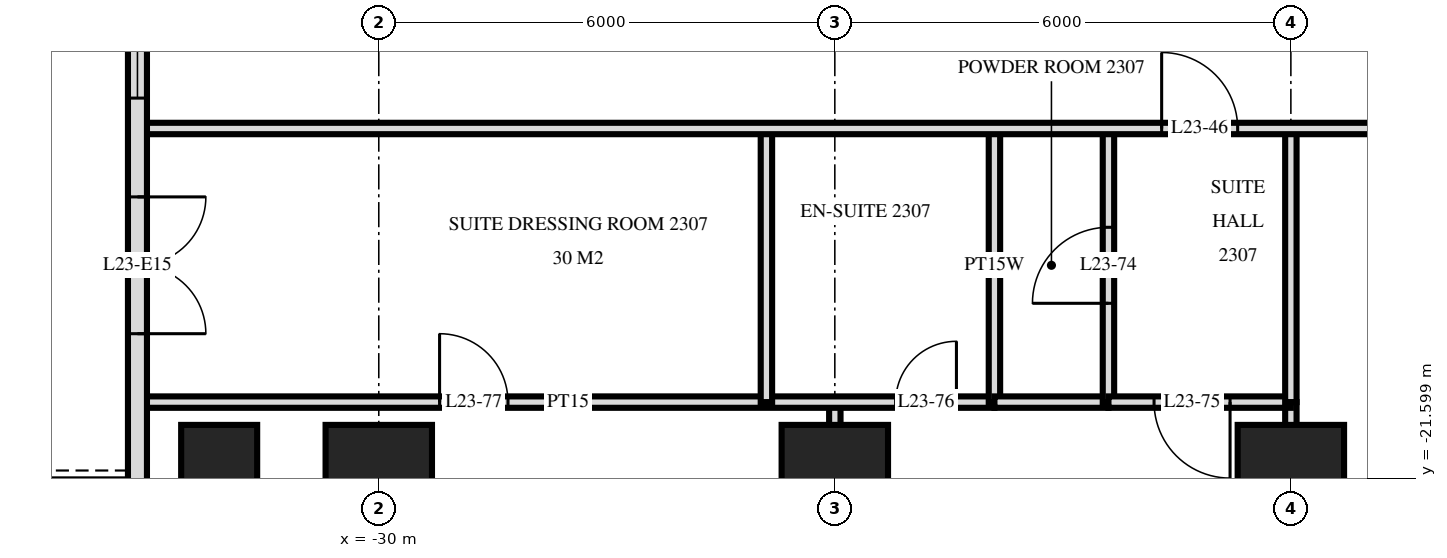
"""IFC4 building model, lengths in metres.
Left out: names, types, materials, properties, quantities, classifications, styles, units other than length and angle.
Written with IfcOpenShell. Run it as: python <this file> out.ifc"""

import sys

from ifc_helpers import new_model, si_unit, direction, frame, frame_2d, origin, origin_2d, place, context, subcontext, project, spatial, rectangle, extrude, element, fill, save


model = new_model("IFC4")
c1 = context("Model", 3, precision=1e-05, world=origin(), true_north=direction((0.0, 1.0)))
c2 = subcontext(c1, "Body", "Model", "MODEL_VIEW")
j1 = project(units=[si_unit("LENGTHUNIT", "METRE"), si_unit("PLANEANGLEUNIT", "RADIAN")], contexts=[c1])
p1 = place(None, origin())
s1 = spatial("IfcSite", under=j1, at=p1, CompositionType="ELEMENT")
p2 = place(p1, origin())
s2 = spatial("IfcBuilding", under=s1, at=p2, CompositionType="ELEMENT")
p3 = place(p2, frame((0.0, 0.0, 92.4)))
s3 = spatial("IfcBuildingStorey", under=s2, at=p3, CompositionType="ELEMENT", Elevation=92.4)
p4 = place(p3, frame((-32.1, -21.6, 0.0), z_axis=(0.0, 0.0, 1.0), x_axis=(0.0, 1.0, 0.0)))
e1 = element("IfcColumn", 1, at=p4, inside=s3, PredefinedType="COLUMN", context=c2, shape_type="SweptSolid", body=[
    extrude(rectangle(XDim=1.4, YDim=1.0, at=origin_2d()), origin(), (0.0, 0.0, 1.0), 3.6),
])
for number, where, z_axis, x_axis in (
    (2, (-30.0, -21.6, 0.0), (0.0, 0.0, 1.0), (1.0, 0.0, 0.0)),
    (3, (-24.0, -21.6, 0.0), (0.0, 0.0, 1.0), (1.0, 0.0, 0.0)),
    (4, (-18.0, -21.6, 0.0), (0.0, 0.0, 1.0), (1.0, 0.0, 0.0)),
):
    element("IfcColumn", number, at=place(p3, frame(where, z_axis=z_axis, x_axis=x_axis)), inside=s3, PredefinedType="COLUMN", context=c2, shape_type="SweptSolid", body=[
        extrude(rectangle(XDim=1.4, YDim=1.4, at=origin_2d()), origin(), (0.0, 0.0, 1.0), 3.6),
    ])
p5 = place(p3, frame((-33.175, -3.325, 0.0), z_axis=(0.0, 0.0, 1.0), x_axis=(0.0, -1.0, 0.0)))
e5 = element("IfcWall", 5, at=p5, inside=s3, PredefinedType="SOLIDWALL", context=c2, shape_type="SweptSolid", body=[
    extrude(rectangle(XDim=21.551, YDim=0.25, at=frame_2d((10.775, 0.0))), origin(), (0.0, 0.0, 1.0), 3.32),
])
p6 = place(p5, frame((7.025, 0.0, 0.0)))
e6 = element("IfcOpeningElement", 6, at=p6, cuts=e5, PredefinedType="OPENING", context=c2, shape_type="SweptSolid", body=[
    extrude(rectangle(XDim=1.8, YDim=2.4, at=frame_2d((0.9, 1.2))), frame((0.0, 0.135, 0.0), z_axis=(0.0, -1.0, 0.0), x_axis=(1.0, 0.0, 0.0)), (0.0, 0.0, 1.0), 0.27),
])
p7 = place(p5, frame((12.075, 0.0, 0.3)))
e7 = element("IfcOpeningElement", 7, at=p7, cuts=e5, PredefinedType="OPENING", context=c2, shape_type="SweptSolid", body=[
    extrude(rectangle(XDim=1.2, YDim=2.1, at=frame_2d((0.6, 1.05))), frame((0.0, 0.135, 0.0), z_axis=(0.0, -1.0, 0.0), x_axis=(1.0, 0.0, 0.0)), (0.0, 0.0, 1.0), 0.27),
])
p8 = place(p5, frame((14.575, 0.0, 0.0)))
e8 = element("IfcOpeningElement", 8, at=p8, cuts=e5, PredefinedType="OPENING", context=c2, shape_type="SweptSolid", body=[
    extrude(rectangle(XDim=1.8, YDim=2.4, at=frame_2d((0.9, 1.2))), frame((0.0, 0.135, 0.0), z_axis=(0.0, -1.0, 0.0), x_axis=(1.0, 0.0, 0.0)), (0.0, 0.0, 1.0), 0.27),
])
p9 = place(p5, frame((18.875, 0.0, 0.0)))
e9 = element("IfcOpeningElement", 9, at=p9, cuts=e5, PredefinedType="OPENING", context=c2, shape_type="SweptSolid", body=[
    extrude(rectangle(XDim=1.8, YDim=2.4, at=frame_2d((0.9, 1.2))), frame((0.0, 0.135, 0.0), z_axis=(0.0, -1.0, 0.0), x_axis=(1.0, 0.0, 0.0)), (0.0, 0.0, 1.0), 0.27),
])
p10 = place(p3, frame((-18.0, -20.6, 0.0), z_axis=(0.0, 0.0, 1.0), x_axis=(0.0, 1.0, 0.0)))
e10 = element("IfcWall", 10, at=p10, inside=s3, PredefinedType="PARTITIONING", context=c2, shape_type="SweptSolid", body=[
    extrude(rectangle(XDim=3.6, YDim=0.15, at=frame_2d((1.8, 0.0))), origin(), (0.0, 0.0, 1.0), 3.32),
])
p11 = place(p3, frame((-18.0, -29.22, 0.0), z_axis=(0.0, 0.0, 1.0), x_axis=(0.0, 1.0, 0.0)))
e11 = element("IfcWall", 11, at=p11, inside=s3, PredefinedType="PARTITIONING", context=c2, shape_type="SweptSolid", body=[
    extrude(rectangle(XDim=8.62, YDim=0.15, at=frame_2d((4.31, 0.0))), origin(), (0.0, 0.0, 1.0), 3.32),
])
p12 = place(p3, frame((-20.4, -20.6, 0.0), z_axis=(0.0, 0.0, 1.0), x_axis=(0.0, 1.0, 0.0)))
e12 = element("IfcWall", 12, at=p12, inside=s3, PredefinedType="PARTITIONING", context=c2, shape_type="SweptSolid", body=[
    extrude(rectangle(XDim=3.6, YDim=0.15, at=frame_2d((1.8, 0.0))), origin(), (0.0, 0.0, 1.0), 3.32),
])
p13 = place(p12, frame((1.3, 0.0, 0.0)))
e13 = element("IfcOpeningElement", 13, at=p13, cuts=e12, PredefinedType="OPENING", context=c2, shape_type="SweptSolid", body=[
    extrude(rectangle(XDim=1.0, YDim=2.1, at=frame_2d((0.5, 1.05))), frame((0.0, 0.085, 0.0), z_axis=(0.0, -1.0, 0.0), x_axis=(1.0, 0.0, 0.0)), (0.0, 0.0, 1.0), 0.17),
])
p14 = place(p3, frame((-21.9, -20.6, 0.0), z_axis=(0.0, 0.0, 1.0), x_axis=(0.0, 1.0, 0.0)))
e14 = element("IfcWall", 14, at=p14, inside=s3, PredefinedType="PLUMBINGWALL", context=c2, shape_type="SweptSolid", body=[
    extrude(rectangle(XDim=3.6, YDim=0.15, at=frame_2d((1.8, 0.0))), origin(), (0.0, 0.0, 1.0), 3.32),
])
p15 = place(p3, frame((-24.0, -29.22, 0.0), z_axis=(0.0, 0.0, 1.0), x_axis=(0.0, 1.0, 0.0)))
e15 = element("IfcWall", 15, at=p15, inside=s3, PredefinedType="PARTITIONING", context=c2, shape_type="SweptSolid", body=[
    extrude(rectangle(XDim=8.62, YDim=0.15, at=frame_2d((4.31, 0.0))), origin(), (0.0, 0.0, 1.0), 3.32),
])
p16 = place(p15, frame((3.79, 0.0, 0.0)))
e16 = element("IfcOpeningElement", 16, at=p16, cuts=e15, PredefinedType="OPENING", context=c2, shape_type="SweptSolid", body=[
    extrude(rectangle(XDim=0.9, YDim=2.1, at=frame_2d((0.45, 1.05))), frame((0.0, 0.085, 0.0), z_axis=(0.0, -1.0, 0.0), x_axis=(1.0, 0.0, 0.0)), (0.0, 0.0, 1.0), 0.17),
])
p17 = place(p3, frame((-24.9, -20.6, 0.0), z_axis=(0.0, 0.0, 1.0), x_axis=(0.0, 1.0, 0.0)))
e17 = element("IfcWall", 17, at=p17, inside=s3, PredefinedType="PARTITIONING", context=c2, shape_type="SweptSolid", body=[
    extrude(rectangle(XDim=3.6, YDim=0.15, at=frame_2d((1.8, 0.0))), origin(), (0.0, 0.0, 1.0), 3.32),
])
p18 = place(p3, frame((-20.4, -20.6, 0.0), z_axis=(0.0, 0.0, 1.0), x_axis=(1.0, 0.0, 0.0)))
e18 = element("IfcWall", 18, at=p18, inside=s3, PredefinedType="PARTITIONING", context=c2, shape_type="SweptSolid", body=[
    extrude(rectangle(XDim=2.4, YDim=0.15, at=frame_2d((1.2, 0.0))), origin(), (0.0, 0.0, 1.0), 3.32),
])
p19 = place(p18, frame((0.6, 0.0, 0.0)))
e19 = element("IfcOpeningElement", 19, at=p19, cuts=e18, PredefinedType="OPENING", context=c2, shape_type="SweptSolid", body=[
    extrude(rectangle(XDim=1.0, YDim=2.1, at=frame_2d((0.5, 1.05))), frame((0.0, 0.085, 0.0), z_axis=(0.0, -1.0, 0.0), x_axis=(1.0, 0.0, 0.0)), (0.0, 0.0, 1.0), 0.17),
])
p20 = place(p3, frame((-33.12, -20.6, 0.0), z_axis=(0.0, 0.0, 1.0), x_axis=(1.0, 0.0, 0.0)))
e20 = element("IfcWall", 20, at=p20, inside=s3, PredefinedType="PARTITIONING", context=c2, shape_type="SweptSolid", body=[
    extrude(rectangle(XDim=11.22, YDim=0.15, at=frame_2d((5.61, 0.0))), origin(), (0.0, 0.0, 1.0), 3.32),
])
p21 = place(p20, frame((9.92, 0.0, 0.0)))
e21 = element("IfcOpeningElement", 21, at=p21, cuts=e20, PredefinedType="OPENING", context=c2, shape_type="SweptSolid", body=[
    extrude(rectangle(XDim=0.8, YDim=2.1, at=frame_2d((0.4, 1.05))), frame((0.0, 0.085, 0.0), z_axis=(0.0, -1.0, 0.0), x_axis=(1.0, 0.0, 0.0)), (0.0, 0.0, 1.0), 0.17),
])
p22 = place(p20, frame((3.92, 0.0, 0.0)))
e22 = element("IfcOpeningElement", 22, at=p22, cuts=e20, PredefinedType="OPENING", context=c2, shape_type="SweptSolid", body=[
    extrude(rectangle(XDim=0.9, YDim=2.1, at=frame_2d((0.45, 1.05))), frame((0.0, 0.085, 0.0), z_axis=(0.0, -1.0, 0.0), x_axis=(1.0, 0.0, 0.0)), (0.0, 0.0, 1.0), 0.17),
])
p23 = place(p3, frame((-21.9, -20.6, 0.0), z_axis=(0.0, 0.0, 1.0), x_axis=(1.0, 0.0, 0.0)))
e23 = element("IfcWall", 23, at=p23, inside=s3, PredefinedType="PLUMBINGWALL", context=c2, shape_type="SweptSolid", body=[
    extrude(rectangle(XDim=1.5, YDim=0.15, at=frame_2d((0.75, 0.0))), origin(), (0.0, 0.0, 1.0), 3.32),
])
p24 = place(p3, frame((-33.12, -17.0, 0.0), z_axis=(0.0, 0.0, 1.0), x_axis=(1.0, 0.0, 0.0)))
e24 = element("IfcWall", 24, at=p24, inside=s3, PredefinedType="PARTITIONING", context=c2, shape_type="SweptSolid", body=[
    extrude(rectangle(XDim=66.24, YDim=0.15, at=frame_2d((33.12, 0.0))), origin(), (0.0, 0.0, 1.0), 3.32),
])
p25 = place(p24, frame((16.27, 0.0, 0.0)))
e25 = element("IfcOpeningElement", 25, at=p25, cuts=e24, PredefinedType="OPENING", context=c2, shape_type="SweptSolid", body=[
    extrude(rectangle(XDim=1.0, YDim=2.1, at=frame_2d((0.5, 1.05))), frame((0.0, 0.085, 0.0), z_axis=(0.0, -1.0, 0.0), x_axis=(1.0, 0.0, 0.0)), (0.0, 0.0, 1.0), 0.17),
])
p26 = place(p24, frame((22.97, 0.0, 0.0)))
e26 = element("IfcOpeningElement", 26, at=p26, cuts=e24, PredefinedType="OPENING", context=c2, shape_type="SweptSolid", body=[
    extrude(rectangle(XDim=1.0, YDim=2.1, at=frame_2d((0.5, 1.05))), frame((0.0, 0.085, 0.0), z_axis=(0.0, -1.0, 0.0), x_axis=(1.0, 0.0, 0.0)), (0.0, 0.0, 1.0), 0.17),
])
p27 = place(p24, frame((34.42, 0.0, 0.0)))
e27 = element("IfcOpeningElement", 27, at=p27, cuts=e24, PredefinedType="OPENING", context=c2, shape_type="SweptSolid", body=[
    extrude(rectangle(XDim=1.0, YDim=2.1, at=frame_2d((0.5, 1.05))), frame((0.0, 0.085, 0.0), z_axis=(0.0, -1.0, 0.0), x_axis=(1.0, 0.0, 0.0)), (0.0, 0.0, 1.0), 0.17),
])
p28 = place(p24, frame((39.22, 0.0, 0.0)))
e28 = element("IfcOpeningElement", 28, at=p28, cuts=e24, PredefinedType="OPENING", context=c2, shape_type="SweptSolid", body=[
    extrude(rectangle(XDim=1.0, YDim=2.1, at=frame_2d((0.5, 1.05))), frame((0.0, 0.085, 0.0), z_axis=(0.0, -1.0, 0.0), x_axis=(1.0, 0.0, 0.0)), (0.0, 0.0, 1.0), 0.17),
])
p29 = place(p24, frame((42.27, 0.0, 0.0)))
e29 = element("IfcOpeningElement", 29, at=p29, cuts=e24, PredefinedType="OPENING", context=c2, shape_type="SweptSolid", body=[
    extrude(rectangle(XDim=1.0, YDim=2.1, at=frame_2d((0.5, 1.05))), frame((0.0, 0.085, 0.0), z_axis=(0.0, -1.0, 0.0), x_axis=(1.0, 0.0, 0.0)), (0.0, 0.0, 1.0), 0.17),
])
p30 = place(p24, frame((45.82, 0.0, 0.0)))
e30 = element("IfcOpeningElement", 30, at=p30, cuts=e24, PredefinedType="OPENING", context=c2, shape_type="SweptSolid", body=[
    extrude(rectangle(XDim=1.0, YDim=2.1, at=frame_2d((0.5, 1.05))), frame((0.0, 0.085, 0.0), z_axis=(0.0, -1.0, 0.0), x_axis=(1.0, 0.0, 0.0)), (0.0, 0.0, 1.0), 0.17),
])
p31 = place(p24, frame((13.42, 0.0, 0.0)))
e31 = element("IfcOpeningElement", 31, at=p31, cuts=e24, PredefinedType="OPENING", context=c2, shape_type="SweptSolid", body=[
    extrude(rectangle(XDim=1.0, YDim=2.1, at=frame_2d((0.5, 1.05))), frame((0.0, 0.085, 0.0), z_axis=(0.0, -1.0, 0.0), x_axis=(1.0, 0.0, 0.0)), (0.0, 0.0, 1.0), 0.17),
])
p32 = place(p24, frame((54.82, 0.0, 0.0)))
e32 = element("IfcOpeningElement", 32, at=p32, cuts=e24, PredefinedType="OPENING", context=c2, shape_type="SweptSolid", body=[
    extrude(rectangle(XDim=1.0, YDim=2.1, at=frame_2d((0.5, 1.05))), frame((0.0, 0.085, 0.0), z_axis=(0.0, -1.0, 0.0), x_axis=(1.0, 0.0, 0.0)), (0.0, 0.0, 1.0), 0.17),
])
p33 = place(p7, origin())
e33 = element("IfcWindow", 33, at=p33, inside=s3, PartitioningType="SINGLE_PANEL", PredefinedType="WINDOW", context=c2, shape_type="SweptSolid", body=[
    extrude(rectangle(XDim=1.2, YDim=2.1, at=frame_2d((0.6, 1.05))), frame((0.0, 0.03, 0.0), z_axis=(0.0, -1.0, 0.0), x_axis=(1.0, 0.0, 0.0)), (0.0, 0.0, 1.0), 0.06),
])
fill(e7, e33)
p34 = place(p8, origin())
e34 = element("IfcDoor", 34, at=p34, inside=s3, OperationType="DOUBLE_DOOR_SINGLE_SWING", PredefinedType="DOOR", context=c2, shape_type="SweptSolid", body=[
    extrude(rectangle(XDim=1.8, YDim=2.4, at=frame_2d((0.9, 1.2))), frame((0.0, 0.025, 0.0), z_axis=(0.0, -1.0, 0.0), x_axis=(1.0, 0.0, 0.0)), (0.0, 0.0, 1.0), 0.05),
])
fill(e8, e34)
p35 = place(p31, origin())
e35 = element("IfcDoor", 35, at=p35, inside=s3, OperationType="SINGLE_SWING_RIGHT", PredefinedType="DOOR", context=c2, shape_type="SweptSolid", body=[
    extrude(rectangle(XDim=1.0, YDim=2.1, at=frame_2d((0.5, 1.05))), frame((0.0, 0.025, 0.0), z_axis=(0.0, -1.0, 0.0), x_axis=(1.0, 0.0, 0.0)), (0.0, 0.0, 1.0), 0.05),
])
fill(e31, e35)
p36 = place(p13, origin())
e36 = element("IfcDoor", 36, at=p36, inside=s3, OperationType="SINGLE_SWING_RIGHT", PredefinedType="DOOR", context=c2, shape_type="SweptSolid", body=[
    extrude(rectangle(XDim=1.0, YDim=2.1, at=frame_2d((0.5, 1.05))), frame((0.0, 0.025, 0.0), z_axis=(0.0, -1.0, 0.0), x_axis=(1.0, 0.0, 0.0)), (0.0, 0.0, 1.0), 0.05),
])
fill(e13, e36)
p37 = place(p19, frame((0.5, 0.0, 0.0), z_axis=(0.0, 0.0, 1.0), x_axis=(-1.0, 0.0, 0.0)))
e37 = element("IfcDoor", 37, at=p37, inside=s3, OperationType="SINGLE_SWING_RIGHT", PredefinedType="DOOR", context=c2, shape_type="SweptSolid", body=[
    extrude(rectangle(XDim=1.0, YDim=2.1, at=frame_2d((0.0, 1.05))), frame((0.0, -0.025, 0.0), z_axis=(0.0, 1.0, 0.0), x_axis=(-1.0, 0.0, 0.0)), (0.0, 0.0, 1.0), 0.05),
])
fill(e19, e37)
p38 = place(p21, origin())
e38 = element("IfcDoor", 38, at=p38, inside=s3, OperationType="SINGLE_SWING_LEFT", PredefinedType="DOOR", context=c2, shape_type="SweptSolid", body=[
    extrude(rectangle(XDim=0.8, YDim=2.1, at=frame_2d((0.4, 1.05))), frame((0.0, 0.025, 0.0), z_axis=(0.0, -1.0, 0.0), x_axis=(1.0, 0.0, 0.0)), (0.0, 0.0, 1.0), 0.05),
])
fill(e21, e38)
p39 = place(p22, origin())
e39 = element("IfcDoor", 39, at=p39, inside=s3, OperationType="SINGLE_SWING_RIGHT", PredefinedType="DOOR", context=c2, shape_type="SweptSolid", body=[
    extrude(rectangle(XDim=0.9, YDim=2.1, at=frame_2d((0.45, 1.05))), frame((0.0, 0.025, 0.0), z_axis=(0.0, -1.0, 0.0), x_axis=(1.0, 0.0, 0.0)), (0.0, 0.0, 1.0), 0.05),
])
fill(e22, e39)
save(model, sys.argv[1])
